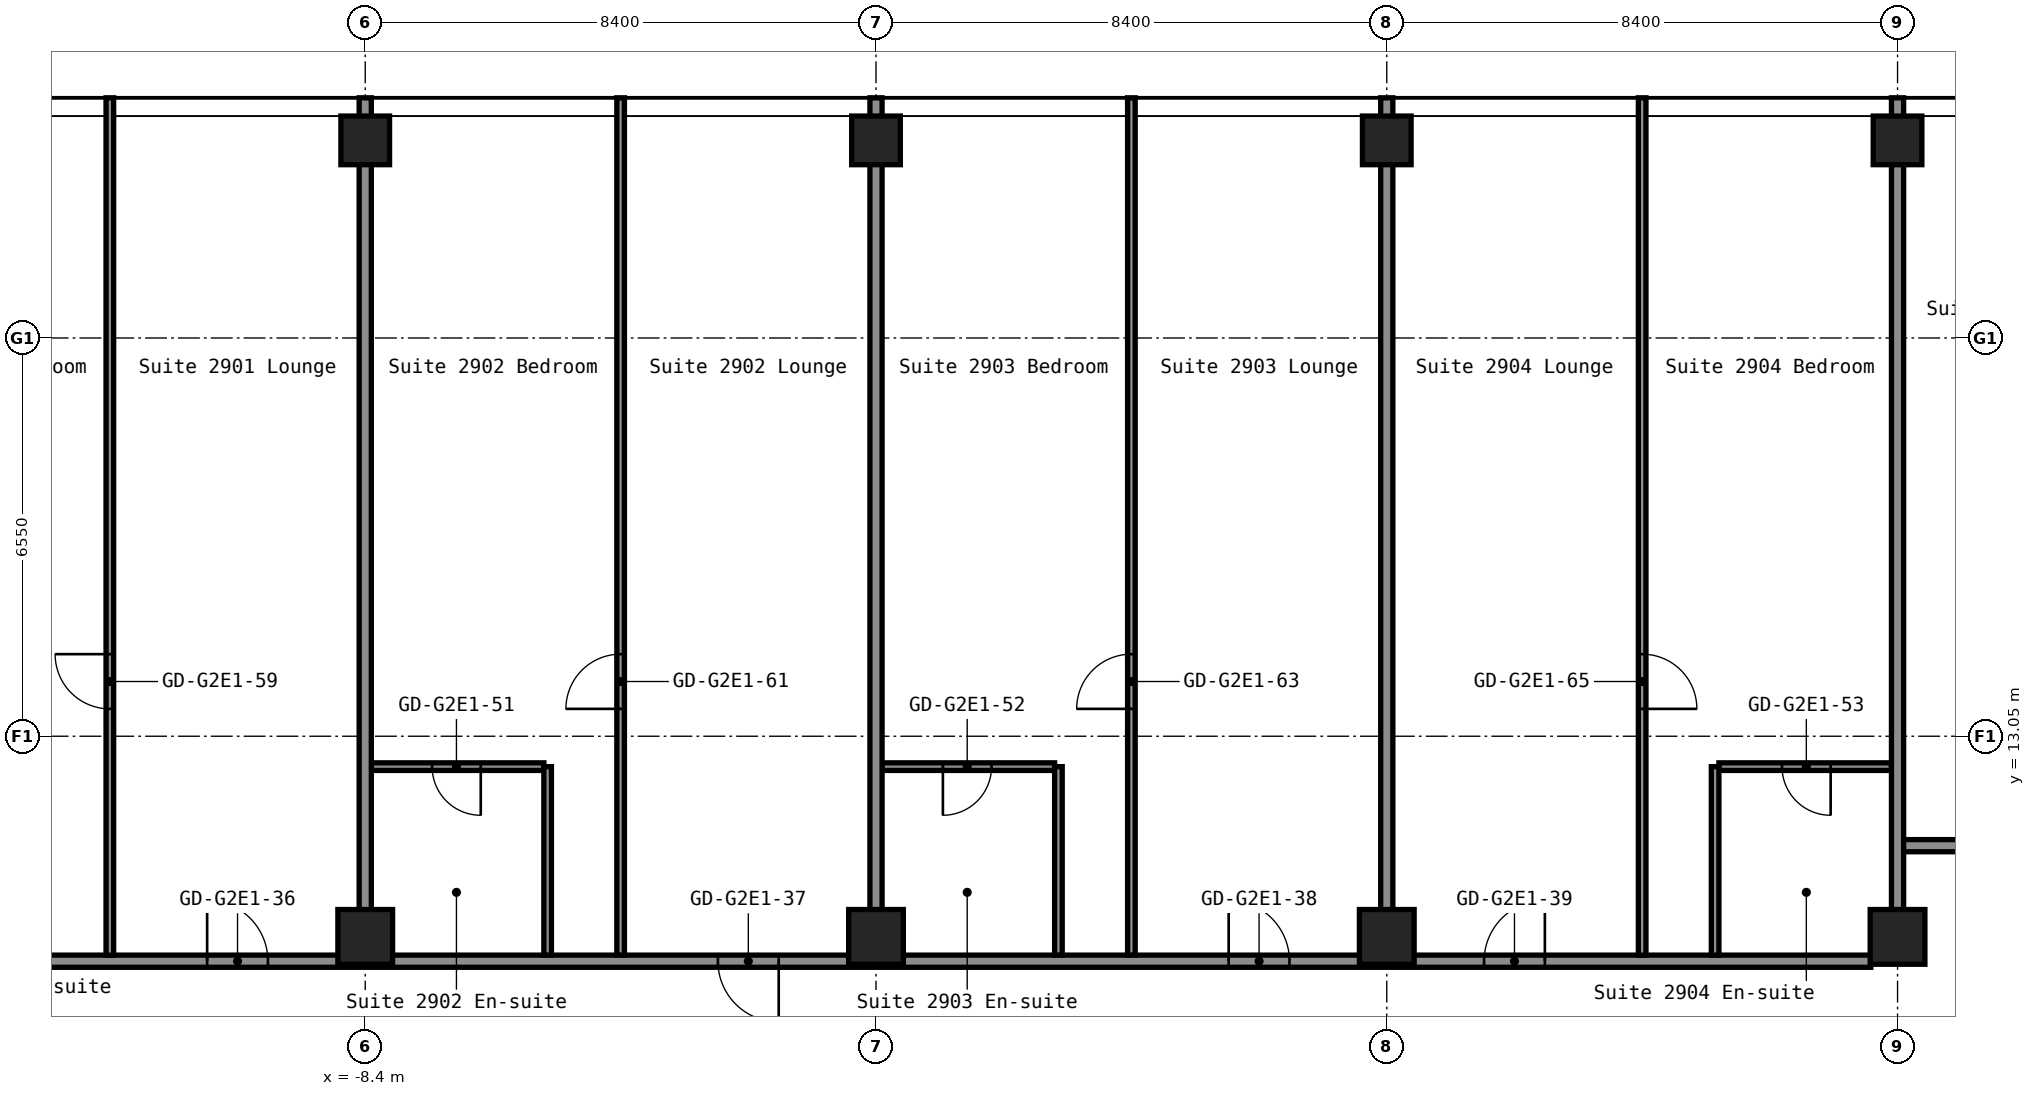
"""IFC4 building model, lengths in metres.
Left out: names, types, materials, properties, quantities, classifications, styles, units other than length and angle.
Written with IfcOpenShell. Run it as: python <this file> out.ifc"""

import sys

from ifc_helpers import new_model, si_unit, direction, frame, frame_2d, origin, origin_2d, place, context, subcontext, project, spatial, rectangle, hollow_rectangle, extrude, element, fill, save


model = new_model("IFC4")
c1 = context("Model", 3, precision=1e-05, world=origin(), true_north=direction((0.0, 1.0)))
c2 = subcontext(c1, "Body", "Model", "MODEL_VIEW")
j1 = project(units=[si_unit("LENGTHUNIT", "METRE"), si_unit("PLANEANGLEUNIT", "RADIAN")], contexts=[c1])
p1 = place(None, origin())
s1 = spatial("IfcSite", under=j1, at=p1, CompositionType="ELEMENT")
p2 = place(p1, origin())
s2 = spatial("IfcBuilding", under=s1, at=p2, CompositionType="ELEMENT")
p3 = place(p2, frame((0.0, 0.0, 104.2)))
s3 = spatial("IfcBuildingStorey", under=s2, at=p3, CompositionType="ELEMENT", Elevation=104.2)
p4 = place(p3, frame((-8.4, 9.75, 0.0), z_axis=(0.0, 0.0, 1.0), x_axis=(1.0, 0.0, 0.0)))
e1 = element("IfcColumn", 1, at=p4, inside=s3, PredefinedType="COLUMN", context=c2, shape_type="SweptSolid", body=[
    extrude(hollow_rectangle(XDim=0.9, YDim=0.9, WallThickness=0.036, at=origin_2d()), origin(), (0.0, 0.0, 1.0), 2.8),
])
p5 = place(p3, frame((-8.4, 22.85, 0.0), z_axis=(0.0, 0.0, 1.0), x_axis=(1.0, 0.0, 0.0)))
e2 = element("IfcColumn", 2, at=p5, inside=s3, PredefinedType="COLUMN", context=c2, shape_type="SweptSolid", body=[
    extrude(hollow_rectangle(XDim=0.8, YDim=0.8, WallThickness=0.032, at=origin_2d()), origin(), (0.0, 0.0, 1.0), 2.8),
])
p6 = place(p3, frame((0.0, 9.75, 0.0), z_axis=(0.0, 0.0, 1.0), x_axis=(1.0, 0.0, 0.0)))
e3 = element("IfcColumn", 3, at=p6, inside=s3, PredefinedType="COLUMN", context=c2, shape_type="SweptSolid", body=[
    extrude(hollow_rectangle(XDim=0.9, YDim=0.9, WallThickness=0.036, at=origin_2d()), origin(), (0.0, 0.0, 1.0), 2.8),
])
p7 = place(p3, frame((0.0, 22.85, 0.0), z_axis=(0.0, 0.0, 1.0), x_axis=(1.0, 0.0, 0.0)))
e4 = element("IfcColumn", 4, at=p7, inside=s3, PredefinedType="COLUMN", context=c2, shape_type="SweptSolid", body=[
    extrude(hollow_rectangle(XDim=0.8, YDim=0.8, WallThickness=0.032, at=origin_2d()), origin(), (0.0, 0.0, 1.0), 2.8),
])
p8 = place(p3, frame((8.4, 9.75, 0.0), z_axis=(0.0, 0.0, 1.0), x_axis=(1.0, 0.0, 0.0)))
e5 = element("IfcColumn", 5, at=p8, inside=s3, PredefinedType="COLUMN", context=c2, shape_type="SweptSolid", body=[
    extrude(hollow_rectangle(XDim=0.9, YDim=0.9, WallThickness=0.036, at=origin_2d()), origin(), (0.0, 0.0, 1.0), 2.8),
])
p9 = place(p3, frame((8.4, 22.85, 0.0), z_axis=(0.0, 0.0, 1.0), x_axis=(1.0, 0.0, 0.0)))
e6 = element("IfcColumn", 6, at=p9, inside=s3, PredefinedType="COLUMN", context=c2, shape_type="SweptSolid", body=[
    extrude(hollow_rectangle(XDim=0.8, YDim=0.8, WallThickness=0.032, at=origin_2d()), origin(), (0.0, 0.0, 1.0), 2.8),
])
p10 = place(p3, frame((16.8, 9.75, 0.0), z_axis=(0.0, 0.0, 1.0), x_axis=(1.0, 0.0, 0.0)))
e7 = element("IfcColumn", 7, at=p10, inside=s3, PredefinedType="COLUMN", context=c2, shape_type="SweptSolid", body=[
    extrude(hollow_rectangle(XDim=0.9, YDim=0.9, WallThickness=0.036, at=origin_2d()), origin(), (0.0, 0.0, 1.0), 2.8),
])
p11 = place(p3, frame((16.8, 22.85, 0.0), z_axis=(0.0, 0.0, 1.0), x_axis=(1.0, 0.0, 0.0)))
e8 = element("IfcColumn", 8, at=p11, inside=s3, PredefinedType="COLUMN", context=c2, shape_type="SweptSolid", body=[
    extrude(hollow_rectangle(XDim=0.8, YDim=0.8, WallThickness=0.032, at=origin_2d()), origin(), (0.0, 0.0, 1.0), 2.8),
])
p12 = place(p3, frame((-16.36, 9.35, 0.0), z_axis=(0.0, 0.0, 1.0), x_axis=(1.0, 0.0, 0.0)))
e9 = element("IfcWall", 9, at=p12, inside=s3, PredefinedType="PARTITIONING", context=c2, shape_type="SweptSolid", body=[
    extrude(rectangle(XDim=32.72, YDim=0.2, at=frame_2d((16.36, 0.0))), origin(), (0.0, 0.0, 1.0), 2.8),
])
p13 = place(p12, frame((5.36, 0.0, 0.0)))
e10 = element("IfcOpeningElement", 10, at=p13, cuts=e9, PredefinedType="OPENING", context=c2, shape_type="SweptSolid", body=[
    extrude(rectangle(XDim=1.0, YDim=2.1, at=frame_2d((0.5, 1.05))), frame((0.0, 0.11, 0.0), z_axis=(0.0, -1.0, 0.0), x_axis=(1.0, 0.0, 0.0)), (0.0, 0.0, 1.0), 0.22),
])
p14 = place(p12, frame((13.76, 0.0, 0.0)))
e11 = element("IfcOpeningElement", 11, at=p14, cuts=e9, PredefinedType="OPENING", context=c2, shape_type="SweptSolid", body=[
    extrude(rectangle(XDim=1.0, YDim=2.1, at=frame_2d((0.5, 1.05))), frame((0.0, 0.11, 0.0), z_axis=(0.0, -1.0, 0.0), x_axis=(1.0, 0.0, 0.0)), (0.0, 0.0, 1.0), 0.22),
])
p15 = place(p12, frame((22.16, 0.0, 0.0)))
e12 = element("IfcOpeningElement", 12, at=p15, cuts=e9, PredefinedType="OPENING", context=c2, shape_type="SweptSolid", body=[
    extrude(rectangle(XDim=1.0, YDim=2.1, at=frame_2d((0.5, 1.05))), frame((0.0, 0.11, 0.0), z_axis=(0.0, -1.0, 0.0), x_axis=(1.0, 0.0, 0.0)), (0.0, 0.0, 1.0), 0.22),
])
p16 = place(p12, frame((26.36, 0.0, 0.0)))
e13 = element("IfcOpeningElement", 13, at=p16, cuts=e9, PredefinedType="OPENING", context=c2, shape_type="SweptSolid", body=[
    extrude(rectangle(XDim=1.0, YDim=2.1, at=frame_2d((0.5, 1.05))), frame((0.0, 0.11, 0.0), z_axis=(0.0, -1.0, 0.0), x_axis=(1.0, 0.0, 0.0)), (0.0, 0.0, 1.0), 0.22),
])
p17 = place(p3, frame((16.8, 11.25, 0.0), z_axis=(0.0, 0.0, 1.0), x_axis=(1.0, 0.0, 0.0)))
e14 = element("IfcWall", 14, at=p17, inside=s3, PredefinedType="PARTITIONING", context=c2, shape_type="SweptSolid", body=[
    extrude(rectangle(XDim=29.7, YDim=0.2, at=frame_2d((14.85, 0.0))), origin(), (0.0, 0.0, 1.0), 2.8),
])
p18 = place(p17, frame((1.6, 0.0, 0.0)))
e15 = element("IfcOpeningElement", 15, at=p18, cuts=e14, PredefinedType="OPENING", context=c2, shape_type="SweptSolid", body=[
    extrude(rectangle(XDim=1.0, YDim=2.1, at=frame_2d((0.5, 1.05))), frame((0.0, 0.11, 0.0), z_axis=(0.0, -1.0, 0.0), x_axis=(1.0, 0.0, 0.0)), (0.0, 0.0, 1.0), 0.22),
])
p19 = place(p17, frame((14.2, 0.0, 0.0)))
e16 = element("IfcOpeningElement", 16, at=p19, cuts=e14, PredefinedType="OPENING", context=c2, shape_type="SweptSolid", body=[
    extrude(rectangle(XDim=1.0, YDim=2.1, at=frame_2d((0.5, 1.05))), frame((0.0, 0.11, 0.0), z_axis=(0.0, -1.0, 0.0), x_axis=(1.0, 0.0, 0.0)), (0.0, 0.0, 1.0), 0.22),
])
p20 = place(p17, frame((22.6, 0.0, 0.0)))
e17 = element("IfcOpeningElement", 17, at=p20, cuts=e14, PredefinedType="OPENING", context=c2, shape_type="SweptSolid", body=[
    extrude(rectangle(XDim=1.0, YDim=2.1, at=frame_2d((0.5, 1.05))), frame((0.0, 0.11, 0.0), z_axis=(0.0, -1.0, 0.0), x_axis=(1.0, 0.0, 0.0)), (0.0, 0.0, 1.0), 0.22),
])
p21 = place(p17, frame((26.85, 0.0, 0.0)))
e18 = element("IfcOpeningElement", 18, at=p21, cuts=e14, PredefinedType="OPENING", context=c2, shape_type="SweptSolid", body=[
    extrude(rectangle(XDim=0.9, YDim=2.1, at=frame_2d((0.45, 1.05))), frame((0.0, 0.11, 0.0), z_axis=(0.0, -1.0, 0.0), x_axis=(1.0, 0.0, 0.0)), (0.0, 0.0, 1.0), 0.22),
])
p22 = place(p3, frame((-8.3, 12.55, 0.0), z_axis=(0.0, 0.0, 1.0), x_axis=(1.0, 0.0, 0.0)))
e19 = element("IfcWall", 19, at=p22, inside=s3, PredefinedType="PARTITIONING", context=c2, shape_type="SweptSolid", body=[
    extrude(rectangle(XDim=2.838, YDim=0.125, at=frame_2d((1.419, 0.0))), origin(), (0.0, 0.0, 1.0), 2.8),
])
p23 = place(p22, frame((1.0, 0.0, 0.0)))
e20 = element("IfcOpeningElement", 20, at=p23, cuts=e19, PredefinedType="OPENING", context=c2, shape_type="SweptSolid", body=[
    extrude(rectangle(XDim=0.8, YDim=2.1, at=frame_2d((0.4, 1.05))), frame((0.0, 0.073, 0.0), z_axis=(0.0, -1.0, 0.0), x_axis=(1.0, 0.0, 0.0)), (0.0, 0.0, 1.0), 0.145),
])
p24 = place(p3, frame((0.1, 12.55, 0.0), z_axis=(0.0, 0.0, 1.0), x_axis=(1.0, 0.0, 0.0)))
e21 = element("IfcWall", 21, at=p24, inside=s3, PredefinedType="PARTITIONING", context=c2, shape_type="SweptSolid", body=[
    extrude(rectangle(XDim=2.837, YDim=0.125, at=frame_2d((1.419, 0.0))), origin(), (0.0, 0.0, 1.0), 2.8),
])
p25 = place(p24, frame((1.0, 0.0, 0.0)))
e22 = element("IfcOpeningElement", 22, at=p25, cuts=e21, PredefinedType="OPENING", context=c2, shape_type="SweptSolid", body=[
    extrude(rectangle(XDim=0.8, YDim=2.1, at=frame_2d((0.4, 1.05))), frame((0.0, 0.073, 0.0), z_axis=(0.0, -1.0, 0.0), x_axis=(1.0, 0.0, 0.0)), (0.0, 0.0, 1.0), 0.145),
])
p26 = place(p3, frame((13.863, 12.55, 0.0), z_axis=(0.0, 0.0, 1.0), x_axis=(1.0, 0.0, 0.0)))
e23 = element("IfcWall", 23, at=p26, inside=s3, PredefinedType="PARTITIONING", context=c2, shape_type="SweptSolid", body=[
    extrude(rectangle(XDim=2.837, YDim=0.125, at=frame_2d((1.419, 0.0))), origin(), (0.0, 0.0, 1.0), 2.8),
])
p27 = place(p26, frame((1.038, 0.0, 0.0)))
e24 = element("IfcOpeningElement", 24, at=p27, cuts=e23, PredefinedType="OPENING", context=c2, shape_type="SweptSolid", body=[
    extrude(rectangle(XDim=0.8, YDim=2.1, at=frame_2d((0.4, 1.05))), frame((0.0, 0.073, 0.0), z_axis=(0.0, -1.0, 0.0), x_axis=(1.0, 0.0, 0.0)), (0.0, 0.0, 1.0), 0.145),
])
p28 = place(p3, frame((-12.6, 9.45, 0.0), z_axis=(0.0, 0.0, 1.0), x_axis=(0.0, 1.0, 0.0)))
e25 = element("IfcWall", 25, at=p28, inside=s3, PredefinedType="PARTITIONING", context=c2, shape_type="SweptSolid", body=[
    extrude(rectangle(XDim=14.1, YDim=0.125, at=frame_2d((7.05, 0.0))), origin(), (0.0, 0.0, 1.0), 2.8),
])
p29 = place(p28, frame((4.05, 0.0, 0.0)))
e26 = element("IfcOpeningElement", 26, at=p29, cuts=e25, PredefinedType="OPENING", context=c2, shape_type="SweptSolid", body=[
    extrude(rectangle(XDim=0.9, YDim=2.1, at=frame_2d((0.45, 1.05))), frame((0.0, 0.073, 0.0), z_axis=(0.0, -1.0, 0.0), x_axis=(1.0, 0.0, 0.0)), (0.0, 0.0, 1.0), 0.145),
])
p30 = place(p3, frame((-8.4, 10.19, 0.0), z_axis=(0.0, 0.0, 1.0), x_axis=(0.0, 1.0, 0.0)))
e27 = element("IfcWall", 27, at=p30, inside=s3, PredefinedType="PARTITIONING", context=c2, shape_type="SweptSolid", body=[
    extrude(rectangle(XDim=13.36, YDim=0.2, at=frame_2d((6.68, 0.0))), origin(), (0.0, 0.0, 1.0), 2.8),
])
p31 = place(p3, frame((-5.4, 9.45, 0.0), z_axis=(0.0, 0.0, 1.0), x_axis=(0.0, 1.0, 0.0)))
e28 = element("IfcWall", 28, at=p31, inside=s3, PredefinedType="PARTITIONING", context=c2, shape_type="SweptSolid", body=[
    extrude(rectangle(XDim=3.1, YDim=0.125, at=frame_2d((1.55, 0.0))), origin(), (0.0, 0.0, 1.0), 2.8),
])
p32 = place(p3, frame((-4.2, 9.45, 0.0), z_axis=(0.0, 0.0, 1.0), x_axis=(0.0, 1.0, 0.0)))
e29 = element("IfcWall", 29, at=p32, inside=s3, PredefinedType="PARTITIONING", context=c2, shape_type="SweptSolid", body=[
    extrude(rectangle(XDim=14.1, YDim=0.125, at=frame_2d((7.05, 0.0))), origin(), (0.0, 0.0, 1.0), 2.8),
])
p33 = place(p32, frame((4.05, 0.0, 0.0)))
e30 = element("IfcOpeningElement", 30, at=p33, cuts=e29, PredefinedType="OPENING", context=c2, shape_type="SweptSolid", body=[
    extrude(rectangle(XDim=0.9, YDim=2.1, at=frame_2d((0.45, 1.05))), frame((0.0, 0.073, 0.0), z_axis=(0.0, -1.0, 0.0), x_axis=(1.0, 0.0, 0.0)), (0.0, 0.0, 1.0), 0.145),
])
p34 = place(p3, frame((0.0, 10.19, 0.0), z_axis=(0.0, 0.0, 1.0), x_axis=(0.0, 1.0, 0.0)))
e31 = element("IfcWall", 31, at=p34, inside=s3, PredefinedType="PARTITIONING", context=c2, shape_type="SweptSolid", body=[
    extrude(rectangle(XDim=13.36, YDim=0.2, at=frame_2d((6.68, 0.0))), origin(), (0.0, 0.0, 1.0), 2.8),
])
p35 = place(p3, frame((3.0, 9.45, 0.0), z_axis=(0.0, 0.0, 1.0), x_axis=(0.0, 1.0, 0.0)))
e32 = element("IfcWall", 32, at=p35, inside=s3, PredefinedType="PARTITIONING", context=c2, shape_type="SweptSolid", body=[
    extrude(rectangle(XDim=3.1, YDim=0.125, at=frame_2d((1.55, 0.0))), origin(), (0.0, 0.0, 1.0), 2.8),
])
p36 = place(p3, frame((4.2, 9.45, 0.0), z_axis=(0.0, 0.0, 1.0), x_axis=(0.0, 1.0, 0.0)))
e33 = element("IfcWall", 33, at=p36, inside=s3, PredefinedType="PARTITIONING", context=c2, shape_type="SweptSolid", body=[
    extrude(rectangle(XDim=14.1, YDim=0.125, at=frame_2d((7.05, 0.0))), origin(), (0.0, 0.0, 1.0), 2.8),
])
p37 = place(p36, frame((4.05, 0.0, 0.0)))
e34 = element("IfcOpeningElement", 34, at=p37, cuts=e33, PredefinedType="OPENING", context=c2, shape_type="SweptSolid", body=[
    extrude(rectangle(XDim=0.9, YDim=2.1, at=frame_2d((0.45, 1.05))), frame((0.0, 0.073, 0.0), z_axis=(0.0, -1.0, 0.0), x_axis=(1.0, 0.0, 0.0)), (0.0, 0.0, 1.0), 0.145),
])
p38 = place(p3, frame((8.4, 10.19, 0.0), z_axis=(0.0, 0.0, 1.0), x_axis=(0.0, 1.0, 0.0)))
e35 = element("IfcWall", 35, at=p38, inside=s3, PredefinedType="PARTITIONING", context=c2, shape_type="SweptSolid", body=[
    extrude(rectangle(XDim=13.36, YDim=0.2, at=frame_2d((6.68, 0.0))), origin(), (0.0, 0.0, 1.0), 2.8),
])
p39 = place(p3, frame((12.6, 9.45, 0.0), z_axis=(0.0, 0.0, 1.0), x_axis=(0.0, 1.0, 0.0)))
e36 = element("IfcWall", 36, at=p39, inside=s3, PredefinedType="PARTITIONING", context=c2, shape_type="SweptSolid", body=[
    extrude(rectangle(XDim=14.1, YDim=0.125, at=frame_2d((7.05, 0.0))), origin(), (0.0, 0.0, 1.0), 2.8),
])
p40 = place(p39, frame((4.05, 0.0, 0.0)))
e37 = element("IfcOpeningElement", 37, at=p40, cuts=e36, PredefinedType="OPENING", context=c2, shape_type="SweptSolid", body=[
    extrude(rectangle(XDim=0.9, YDim=2.1, at=frame_2d((0.45, 1.05))), frame((0.0, 0.073, 0.0), z_axis=(0.0, -1.0, 0.0), x_axis=(1.0, 0.0, 0.0)), (0.0, 0.0, 1.0), 0.145),
])
p41 = place(p3, frame((13.8, 9.45, 0.0), z_axis=(0.0, 0.0, 1.0), x_axis=(0.0, 1.0, 0.0)))
e38 = element("IfcWall", 38, at=p41, inside=s3, PredefinedType="PARTITIONING", context=c2, shape_type="SweptSolid", body=[
    extrude(rectangle(XDim=3.1, YDim=0.125, at=frame_2d((1.55, 0.0))), origin(), (0.0, 0.0, 1.0), 2.8),
])
p42 = place(p3, frame((16.8, 10.19, 0.0), z_axis=(0.0, 0.0, 1.0), x_axis=(0.0, 1.0, 0.0)))
e39 = element("IfcWall", 39, at=p42, inside=s3, PredefinedType="PARTITIONING", context=c2, shape_type="SweptSolid", body=[
    extrude(rectangle(XDim=13.36, YDim=0.2, at=frame_2d((6.68, 0.0))), origin(), (0.0, 0.0, 1.0), 2.8),
])
p43 = place(p13, origin())
e40 = element("IfcDoor", 40, at=p43, inside=s3, OperationType="SINGLE_SWING_RIGHT", PredefinedType="DOOR", context=c2, shape_type="SweptSolid", body=[
    extrude(rectangle(XDim=1.0, YDim=2.1, at=frame_2d((0.5, 1.05))), frame((0.0, 0.025, 0.0), z_axis=(0.0, -1.0, 0.0), x_axis=(1.0, 0.0, 0.0)), (0.0, 0.0, 1.0), 0.05),
])
fill(e10, e40)
p44 = place(p14, origin())
e41 = element("IfcDoor", 41, at=p44, inside=s3, OperationType="SINGLE_SWING_RIGHT", PredefinedType="DOOR", context=c2, shape_type="SweptSolid", body=[
    extrude(rectangle(XDim=1.0, YDim=2.1, at=frame_2d((0.5, 1.05))), frame((0.0, 0.025, 0.0), z_axis=(0.0, -1.0, 0.0), x_axis=(1.0, 0.0, 0.0)), (0.0, 0.0, 1.0), 0.05),
])
fill(e11, e41)
p45 = place(p15, origin())
e42 = element("IfcDoor", 42, at=p45, inside=s3, OperationType="SINGLE_SWING_RIGHT", PredefinedType="DOOR", context=c2, shape_type="SweptSolid", body=[
    extrude(rectangle(XDim=1.0, YDim=2.1, at=frame_2d((0.5, 1.05))), frame((0.0, 0.025, 0.0), z_axis=(0.0, -1.0, 0.0), x_axis=(1.0, 0.0, 0.0)), (0.0, 0.0, 1.0), 0.05),
])
fill(e12, e42)
p46 = place(p16, origin())
e43 = element("IfcDoor", 43, at=p46, inside=s3, OperationType="SINGLE_SWING_LEFT", PredefinedType="DOOR", context=c2, shape_type="SweptSolid", body=[
    extrude(rectangle(XDim=1.0, YDim=2.1, at=frame_2d((0.5, 1.05))), frame((0.0, 0.025, 0.0), z_axis=(0.0, -1.0, 0.0), x_axis=(1.0, 0.0, 0.0)), (0.0, 0.0, 1.0), 0.05),
])
fill(e13, e43)
p47 = place(p23, origin())
e44 = element("IfcDoor", 44, at=p47, inside=s3, OperationType="SINGLE_SWING_RIGHT", PredefinedType="DOOR", context=c2, shape_type="SweptSolid", body=[
    extrude(rectangle(XDim=0.8, YDim=2.1, at=frame_2d((0.4, 1.05))), frame((0.0, 0.025, 0.0), z_axis=(0.0, -1.0, 0.0), x_axis=(1.0, 0.0, 0.0)), (0.0, 0.0, 1.0), 0.05),
])
fill(e20, e44)
p48 = place(p25, origin())
e45 = element("IfcDoor", 45, at=p48, inside=s3, OperationType="SINGLE_SWING_LEFT", PredefinedType="DOOR", context=c2, shape_type="SweptSolid", body=[
    extrude(rectangle(XDim=0.8, YDim=2.1, at=frame_2d((0.4, 1.05))), frame((0.0, 0.025, 0.0), z_axis=(0.0, -1.0, 0.0), x_axis=(1.0, 0.0, 0.0)), (0.0, 0.0, 1.0), 0.05),
])
fill(e22, e45)
p49 = place(p27, origin())
e46 = element("IfcDoor", 46, at=p49, inside=s3, OperationType="SINGLE_SWING_RIGHT", PredefinedType="DOOR", context=c2, shape_type="SweptSolid", body=[
    extrude(rectangle(XDim=0.8, YDim=2.1, at=frame_2d((0.4, 1.05))), frame((0.0, 0.025, 0.0), z_axis=(0.0, -1.0, 0.0), x_axis=(1.0, 0.0, 0.0)), (0.0, 0.0, 1.0), 0.05),
])
fill(e24, e46)
p50 = place(p29, origin())
e47 = element("IfcDoor", 47, at=p50, inside=s3, OperationType="SINGLE_SWING_LEFT", PredefinedType="DOOR", context=c2, shape_type="SweptSolid", body=[
    extrude(rectangle(XDim=0.9, YDim=2.1, at=frame_2d((0.45, 1.05))), frame((0.0, 0.025, 0.0), z_axis=(0.0, -1.0, 0.0), x_axis=(1.0, 0.0, 0.0)), (0.0, 0.0, 1.0), 0.05),
])
fill(e26, e47)
p51 = place(p33, origin())
e48 = element("IfcDoor", 48, at=p51, inside=s3, OperationType="SINGLE_SWING_RIGHT", PredefinedType="DOOR", context=c2, shape_type="SweptSolid", body=[
    extrude(rectangle(XDim=0.9, YDim=2.1, at=frame_2d((0.45, 1.05))), frame((0.0, 0.025, 0.0), z_axis=(0.0, -1.0, 0.0), x_axis=(1.0, 0.0, 0.0)), (0.0, 0.0, 1.0), 0.05),
])
fill(e30, e48)
p52 = place(p37, origin())
e49 = element("IfcDoor", 49, at=p52, inside=s3, OperationType="SINGLE_SWING_RIGHT", PredefinedType="DOOR", context=c2, shape_type="SweptSolid", body=[
    extrude(rectangle(XDim=0.9, YDim=2.1, at=frame_2d((0.45, 1.05))), frame((0.0, 0.025, 0.0), z_axis=(0.0, -1.0, 0.0), x_axis=(1.0, 0.0, 0.0)), (0.0, 0.0, 1.0), 0.05),
])
fill(e34, e49)
p53 = place(p40, origin())
e50 = element("IfcDoor", 50, at=p53, inside=s3, OperationType="SINGLE_SWING_LEFT", PredefinedType="DOOR", context=c2, shape_type="SweptSolid", body=[
    extrude(rectangle(XDim=0.9, YDim=2.1, at=frame_2d((0.45, 1.05))), frame((0.0, 0.025, 0.0), z_axis=(0.0, -1.0, 0.0), x_axis=(1.0, 0.0, 0.0)), (0.0, 0.0, 1.0), 0.05),
])
fill(e37, e50)
save(model, sys.argv[1])
